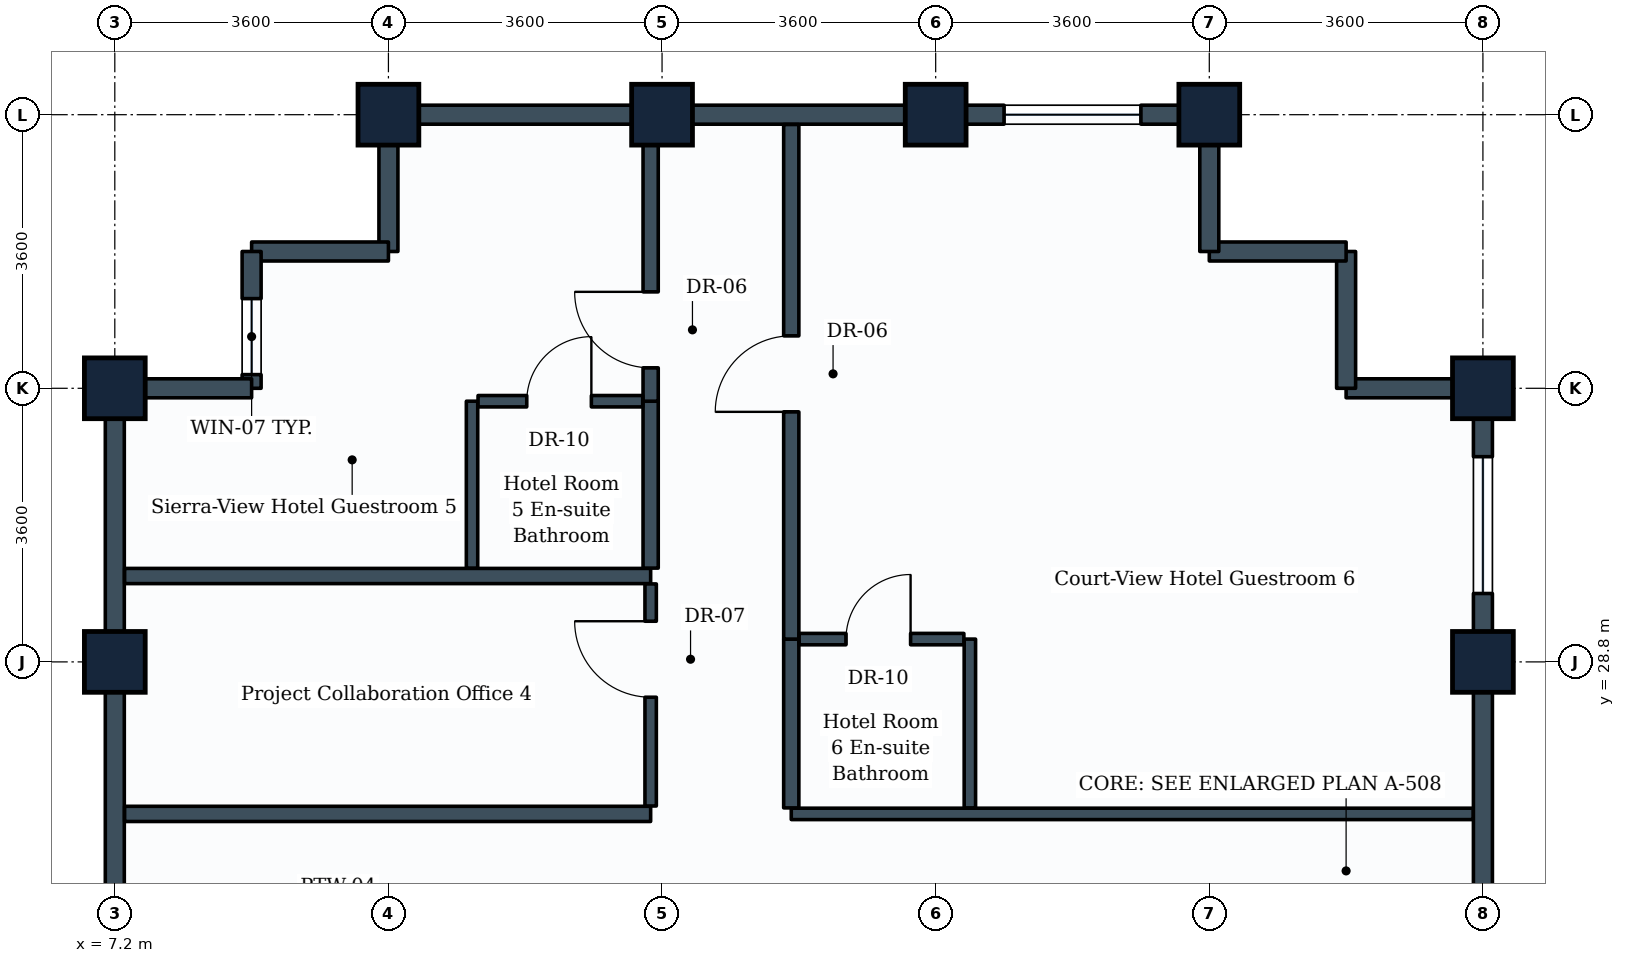
"""IFC4 building model, lengths in metres.
Left out: names, types, materials, properties, quantities, classifications, styles, units other than length and angle.
Written with IfcOpenShell. Run it as: python <this file> out.ifc"""

import sys

from ifc_helpers import new_model, si_unit, direction, frame, frame_2d, origin, origin_2d, place, context, subcontext, project, spatial, rectangle, extrude, element, fill, save


model = new_model("IFC4")
c1 = context("Model", 3, precision=1e-05, world=origin(), true_north=direction((0.0, 1.0)))
c2 = subcontext(c1, "Body", "Model", "MODEL_VIEW")
j1 = project(units=[si_unit("LENGTHUNIT", "METRE"), si_unit("PLANEANGLEUNIT", "RADIAN")], contexts=[c1])
p1 = place(None, origin())
s1 = spatial("IfcSite", under=j1, at=p1, CompositionType="ELEMENT")
p2 = place(p1, origin())
s2 = spatial("IfcBuilding", under=s1, at=p2, CompositionType="ELEMENT")
p3 = place(p2, frame((0.0, 0.0, 235.4)))
s3 = spatial("IfcBuildingStorey", under=s2, at=p3, CompositionType="ELEMENT", Elevation=235.4)
for number, where, z_axis, x_axis in (
    (1, (7.2, 28.8, 0.0), (0.0, 0.0, 1.0), (0.0, 1.0, 0.0)),
    (2, (7.2, 32.4, 0.0), (0.0, 0.0, 1.0), (0.0, 1.0, 0.0)),
    (3, (10.8, 36.0, 0.0), (0.0, 0.0, 1.0), (1.0, 0.0, 0.0)),
    (4, (14.4, 36.0, 0.0), (0.0, 0.0, 1.0), (1.0, 0.0, 0.0)),
    (5, (18.0, 36.0, 0.0), (0.0, 0.0, 1.0), (1.0, 0.0, 0.0)),
    (6, (21.6, 36.0, 0.0), (0.0, 0.0, 1.0), (1.0, 0.0, 0.0)),
    (7, (25.2, 28.8, 0.0), (0.0, 0.0, 1.0), (0.0, 1.0, 0.0)),
    (8, (25.2, 32.4, 0.0), (0.0, 0.0, 1.0), (0.0, 1.0, 0.0)),
):
    element("IfcColumn", number, at=place(p3, frame(where, z_axis=z_axis, x_axis=x_axis)), inside=s3, PredefinedType="COLUMN", context=c2, shape_type="SweptSolid", body=[
        extrude(rectangle(XDim=0.8, YDim=0.8, at=origin_2d()), origin(), (0.0, 0.0, 1.0), 3.6),
    ])
p4 = place(p3, frame((25.2, 28.8, 0.0), z_axis=(0.0, 0.0, 1.0), x_axis=(0.0, -1.0, 0.0)))
e9 = element("IfcWall", 9, at=p4, inside=s3, PredefinedType="STANDARD", context=c2, shape_type="SweptSolid", body=[
    extrude(rectangle(XDim=3.6, YDim=0.25, at=frame_2d((1.8, 0.0))), origin(), (0.0, 0.0, 1.0), 2.83),
])
p5 = place(p3, frame((25.2, 32.4, 0.0), z_axis=(0.0, 0.0, 1.0), x_axis=(0.0, -1.0, 0.0)))
e10 = element("IfcWall", 10, at=p5, inside=s3, PredefinedType="STANDARD", context=c2, shape_type="SweptSolid", body=[
    extrude(rectangle(XDim=3.6, YDim=0.25, at=frame_2d((1.8, 0.0))), origin(), (0.0, 0.0, 1.0), 2.83),
])
p6 = place(p5, frame((0.9, 0.0, 0.85)))
e11 = element("IfcOpeningElement", 11, at=p6, cuts=e10, PredefinedType="OPENING", context=c2, shape_type="SweptSolid", body=[
    extrude(rectangle(XDim=1.8, YDim=1.35, at=frame_2d((0.9, 0.675))), frame((0.0, 0.135, 0.0), z_axis=(0.0, -1.0, 0.0), x_axis=(1.0, 0.0, 0.0)), (0.0, 0.0, 1.0), 0.27),
])
p7 = place(p3, frame((23.4, 32.4, 0.0), z_axis=(0.0, 0.0, 1.0), x_axis=(1.0, 0.0, 0.0)))
e12 = element("IfcWall", 12, at=p7, inside=s3, PredefinedType="STANDARD", context=c2, shape_type="SweptSolid", body=[
    extrude(rectangle(XDim=1.8, YDim=0.25, at=frame_2d((0.9, 0.0))), origin(), (0.0, 0.0, 1.0), 2.83),
])
p8 = place(p3, frame((23.4, 32.4, 0.0), z_axis=(0.0, 0.0, 1.0), x_axis=(0.0, 1.0, 0.0)))
e13 = element("IfcWall", 13, at=p8, inside=s3, PredefinedType="STANDARD", context=c2, shape_type="SweptSolid", body=[
    extrude(rectangle(XDim=1.8, YDim=0.25, at=frame_2d((0.9, 0.0))), origin(), (0.0, 0.0, 1.0), 3.335),
])
p9 = place(p3, frame((21.6, 34.2, 0.0), z_axis=(0.0, 0.0, 1.0), x_axis=(1.0, 0.0, 0.0)))
e14 = element("IfcWall", 14, at=p9, inside=s3, PredefinedType="STANDARD", context=c2, shape_type="SweptSolid", body=[
    extrude(rectangle(XDim=1.8, YDim=0.25, at=frame_2d((0.9, 0.0))), origin(), (0.0, 0.0, 1.0), 3.335),
])
p10 = place(p3, frame((21.6, 34.2, 0.0), z_axis=(0.0, 0.0, 1.0), x_axis=(0.0, 1.0, 0.0)))
e15 = element("IfcWall", 15, at=p10, inside=s3, PredefinedType="STANDARD", context=c2, shape_type="SweptSolid", body=[
    extrude(rectangle(XDim=1.8, YDim=0.25, at=frame_2d((0.9, 0.0))), origin(), (0.0, 0.0, 1.0), 2.83),
])
p11 = place(p3, frame((18.0, 36.0, 0.0), z_axis=(0.0, 0.0, 1.0), x_axis=(1.0, 0.0, 0.0)))
e16 = element("IfcWall", 16, at=p11, inside=s3, PredefinedType="STANDARD", context=c2, shape_type="SweptSolid", body=[
    extrude(rectangle(XDim=3.6, YDim=0.25, at=frame_2d((1.8, 0.0))), origin(), (0.0, 0.0, 1.0), 2.83),
])
p12 = place(p11, frame((0.9, 0.0, 0.85)))
e17 = element("IfcOpeningElement", 17, at=p12, cuts=e16, PredefinedType="OPENING", context=c2, shape_type="SweptSolid", body=[
    extrude(rectangle(XDim=1.8, YDim=1.35, at=frame_2d((0.9, 0.675))), frame((0.0, 0.135, 0.0), z_axis=(0.0, -1.0, 0.0), x_axis=(1.0, 0.0, 0.0)), (0.0, 0.0, 1.0), 0.27),
])
p13 = place(p3, frame((14.4, 36.0, 0.0), z_axis=(0.0, 0.0, 1.0), x_axis=(1.0, 0.0, 0.0)))
e18 = element("IfcWall", 18, at=p13, inside=s3, PredefinedType="STANDARD", context=c2, shape_type="SweptSolid", body=[
    extrude(rectangle(XDim=3.6, YDim=0.25, at=frame_2d((1.8, 0.0))), origin(), (0.0, 0.0, 1.0), 2.83),
])
p14 = place(p3, frame((10.8, 36.0, 0.0), z_axis=(0.0, 0.0, 1.0), x_axis=(1.0, 0.0, 0.0)))
e19 = element("IfcWall", 19, at=p14, inside=s3, PredefinedType="STANDARD", context=c2, shape_type="SweptSolid", body=[
    extrude(rectangle(XDim=3.6, YDim=0.25, at=frame_2d((1.8, 0.0))), origin(), (0.0, 0.0, 1.0), 2.83),
])
p15 = place(p3, frame((10.8, 34.2, 0.0), z_axis=(0.0, 0.0, 1.0), x_axis=(0.0, 1.0, 0.0)))
e20 = element("IfcWall", 20, at=p15, inside=s3, PredefinedType="STANDARD", context=c2, shape_type="SweptSolid", body=[
    extrude(rectangle(XDim=1.8, YDim=0.25, at=frame_2d((0.9, 0.0))), origin(), (0.0, 0.0, 1.0), 2.83),
])
p16 = place(p3, frame((9.0, 34.2, 0.0), z_axis=(0.0, 0.0, 1.0), x_axis=(1.0, 0.0, 0.0)))
e21 = element("IfcWall", 21, at=p16, inside=s3, PredefinedType="STANDARD", context=c2, shape_type="SweptSolid", body=[
    extrude(rectangle(XDim=1.8, YDim=0.25, at=frame_2d((0.9, 0.0))), origin(), (0.0, 0.0, 1.0), 3.335),
])
p17 = place(p3, frame((9.0, 32.4, 0.0), z_axis=(0.0, 0.0, 1.0), x_axis=(0.0, 1.0, 0.0)))
e22 = element("IfcWall", 22, at=p17, inside=s3, PredefinedType="STANDARD", context=c2, shape_type="SweptSolid", body=[
    extrude(rectangle(XDim=1.8, YDim=0.25, at=frame_2d((0.9, 0.0))), origin(), (0.0, 0.0, 1.0), 3.335),
])
p18 = place(p17, frame((0.18, 0.0, 0.85)))
e23 = element("IfcOpeningElement", 23, at=p18, cuts=e22, PredefinedType="OPENING", context=c2, shape_type="SweptSolid", body=[
    extrude(rectangle(XDim=1.0, YDim=1.35, at=frame_2d((0.5, 0.675))), frame((0.0, 0.135, 0.0), z_axis=(0.0, -1.0, 0.0), x_axis=(1.0, 0.0, 0.0)), (0.0, 0.0, 1.0), 0.27),
])
p19 = place(p3, frame((7.2, 32.4, 0.0), z_axis=(0.0, 0.0, 1.0), x_axis=(1.0, 0.0, 0.0)))
e24 = element("IfcWall", 24, at=p19, inside=s3, PredefinedType="STANDARD", context=c2, shape_type="SweptSolid", body=[
    extrude(rectangle(XDim=1.8, YDim=0.25, at=frame_2d((0.9, 0.0))), origin(), (0.0, 0.0, 1.0), 2.83),
])
p20 = place(p3, frame((7.2, 28.8, 0.0), z_axis=(0.0, 0.0, 1.0), x_axis=(0.0, 1.0, 0.0)))
e25 = element("IfcWall", 25, at=p20, inside=s3, PredefinedType="STANDARD", context=c2, shape_type="SweptSolid", body=[
    extrude(rectangle(XDim=3.6, YDim=0.25, at=frame_2d((1.8, 0.0))), origin(), (0.0, 0.0, 1.0), 2.83),
])
p21 = place(p3, frame((7.2, 25.2, 0.0), z_axis=(0.0, 0.0, 1.0), x_axis=(0.0, 1.0, 0.0)))
e26 = element("IfcWall", 26, at=p21, inside=s3, PredefinedType="STANDARD", context=c2, shape_type="SweptSolid", body=[
    extrude(rectangle(XDim=3.6, YDim=0.25, at=frame_2d((1.8, 0.0))), origin(), (0.0, 0.0, 1.0), 2.83),
])
for number, where, z_axis, x_axis in (
    (27, (7.329, 26.8, 0.0), (0.0, 0.0, 1.0), (1.0, 0.0, 0.0)),
    (28, (7.329, 29.93, 0.0), (0.0, 0.0, 1.0), (1.0, 0.0, 0.0)),
):
    element("IfcWall", number, at=place(p3, frame(where, z_axis=z_axis, x_axis=x_axis)), inside=s3, PredefinedType="PARTITIONING", context=c2, shape_type="SweptSolid", body=[
        extrude(rectangle(XDim=6.921, YDim=0.2, at=frame_2d((3.46, 0.0))), origin(), (0.0, 0.0, 1.0), 2.83),
    ])
p22 = place(p3, frame((14.25, 26.904, 0.0), z_axis=(0.0, 0.0, 1.0), x_axis=(0.0, 1.0, 0.0)))
e29 = element("IfcWall", 29, at=p22, inside=s3, PredefinedType="PARTITIONING", context=c2, shape_type="SweptSolid", body=[
    extrude(rectangle(XDim=2.922, YDim=0.15, at=frame_2d((1.461, 0.0))), origin(), (0.0, 0.0, 1.0), 3.03),
])
p23 = place(p22, frame((1.431, 0.0, 0.0)))
e30 = element("IfcOpeningElement", 30, at=p23, cuts=e29, PredefinedType="OPENING", context=c2, shape_type="SweptSolid", body=[
    extrude(rectangle(XDim=1.0, YDim=2.1, at=frame_2d((0.5, 1.05))), frame((0.0, 0.085, 0.0), z_axis=(0.0, -1.0, 0.0), x_axis=(1.0, 0.0, 0.0)), (0.0, 0.0, 1.0), 0.17),
])
p24 = place(p3, frame((14.25, 30.034, 0.0), z_axis=(0.0, 0.0, 1.0), x_axis=(0.0, 1.0, 0.0)))
e31 = element("IfcWall", 31, at=p24, inside=s3, PredefinedType="PARTITIONING", context=c2, shape_type="SweptSolid", body=[
    extrude(rectangle(XDim=2.196, YDim=0.2, at=frame_2d((1.098, 0.0))), origin(), (0.0, 0.0, 1.0), 3.335),
])
p25 = place(p3, frame((14.25, 32.23, 0.0), z_axis=(0.0, 0.0, 1.0), x_axis=(0.0, 1.0, 0.0)))
e32 = element("IfcWall", 32, at=p25, inside=s3, PredefinedType="PARTITIONING", context=c2, shape_type="SweptSolid", body=[
    extrude(rectangle(XDim=3.641, YDim=0.2, at=frame_2d((1.821, 0.0))), origin(), (0.0, 0.0, 1.0), 2.83),
])
p26 = place(p25, frame((0.439, 0.0, 0.0)))
e33 = element("IfcOpeningElement", 33, at=p26, cuts=e32, PredefinedType="OPENING", context=c2, shape_type="SweptSolid", body=[
    extrude(rectangle(XDim=1.0, YDim=2.1, at=frame_2d((0.5, 1.05))), frame((0.0, 0.11, 0.0), z_axis=(0.0, -1.0, 0.0), x_axis=(1.0, 0.0, 0.0)), (0.0, 0.0, 1.0), 0.22),
])
p27 = place(p3, frame((11.9, 30.034, 0.0), z_axis=(0.0, 0.0, 1.0), x_axis=(0.0, 1.0, 0.0)))
e34 = element("IfcWall", 34, at=p27, inside=s3, PredefinedType="PARTITIONING", context=c2, shape_type="SweptSolid", body=[
    extrude(rectangle(XDim=2.196, YDim=0.15, at=frame_2d((1.098, 0.0))), origin(), (0.0, 0.0, 1.0), 3.335),
])
p28 = place(p3, frame((11.979, 32.23, 0.0), z_axis=(0.0, 0.0, 1.0), x_axis=(1.0, 0.0, 0.0)))
e35 = element("IfcWall", 35, at=p28, inside=s3, PredefinedType="PARTITIONING", context=c2, shape_type="SweptSolid", body=[
    extrude(rectangle(XDim=2.167, YDim=0.15, at=frame_2d((1.083, 0.0))), origin(), (0.0, 0.0, 1.0), 3.335),
])
p29 = place(p28, frame((0.641, 0.0, 0.0)))
e36 = element("IfcOpeningElement", 36, at=p29, cuts=e35, PredefinedType="OPENING", context=c2, shape_type="SweptSolid", body=[
    extrude(rectangle(XDim=0.85, YDim=2.1, at=frame_2d((0.425, 1.05))), frame((0.0, 0.085, 0.0), z_axis=(0.0, -1.0, 0.0), x_axis=(1.0, 0.0, 0.0)), (0.0, 0.0, 1.0), 0.17),
])
p30 = place(p3, frame((16.1, 26.8, 0.0), z_axis=(0.0, 0.0, 1.0), x_axis=(1.0, 0.0, 0.0)))
e37 = element("IfcWall", 37, at=p30, inside=s3, PredefinedType="PARTITIONING", context=c2, shape_type="SweptSolid", body=[
    extrude(rectangle(XDim=8.971, YDim=0.15, at=frame_2d((4.485, 0.0))), origin(), (0.0, 0.0, 1.0), 2.83),
])
p31 = place(p3, frame((16.1, 26.879, 0.0), z_axis=(0.0, 0.0, 1.0), x_axis=(0.0, 1.0, 0.0)))
e38 = element("IfcWall", 38, at=p31, inside=s3, PredefinedType="PARTITIONING", context=c2, shape_type="SweptSolid", body=[
    extrude(rectangle(XDim=2.221, YDim=0.2, at=frame_2d((1.111, 0.0))), origin(), (0.0, 0.0, 1.0), 3.03),
])
p32 = place(p3, frame((16.1, 29.1, 0.0), z_axis=(0.0, 0.0, 1.0), x_axis=(0.0, 1.0, 0.0)))
e39 = element("IfcWall", 39, at=p32, inside=s3, PredefinedType="PARTITIONING", context=c2, shape_type="SweptSolid", body=[
    extrude(rectangle(XDim=6.771, YDim=0.2, at=frame_2d((3.385, 0.0))), origin(), (0.0, 0.0, 1.0), 2.83),
])
p33 = place(p32, frame((2.99, 0.0, 0.0)))
e40 = element("IfcOpeningElement", 40, at=p33, cuts=e39, PredefinedType="OPENING", context=c2, shape_type="SweptSolid", body=[
    extrude(rectangle(XDim=1.0, YDim=2.1, at=frame_2d((0.5, 1.05))), frame((0.0, 0.11, 0.0), z_axis=(0.0, -1.0, 0.0), x_axis=(1.0, 0.0, 0.0)), (0.0, 0.0, 1.0), 0.22),
])
p34 = place(p3, frame((18.45, 26.879, 0.0), z_axis=(0.0, 0.0, 1.0), x_axis=(0.0, 1.0, 0.0)))
e41 = element("IfcWall", 41, at=p34, inside=s3, PredefinedType="PARTITIONING", context=c2, shape_type="SweptSolid", body=[
    extrude(rectangle(XDim=2.221, YDim=0.15, at=frame_2d((1.111, 0.0))), origin(), (0.0, 0.0, 1.0), 3.03),
])
p35 = place(p3, frame((16.204, 29.1, 0.0), z_axis=(0.0, 0.0, 1.0), x_axis=(1.0, 0.0, 0.0)))
e42 = element("IfcWall", 42, at=p35, inside=s3, PredefinedType="PARTITIONING", context=c2, shape_type="SweptSolid", body=[
    extrude(rectangle(XDim=2.167, YDim=0.15, at=frame_2d((1.083, 0.0))), origin(), (0.0, 0.0, 1.0), 3.03),
])
p36 = place(p35, frame((0.616, 0.0, 0.0)))
e43 = element("IfcOpeningElement", 43, at=p36, cuts=e42, PredefinedType="OPENING", context=c2, shape_type="SweptSolid", body=[
    extrude(rectangle(XDim=0.85, YDim=2.1, at=frame_2d((0.425, 1.05))), frame((0.0, 0.085, 0.0), z_axis=(0.0, -1.0, 0.0), x_axis=(1.0, 0.0, 0.0)), (0.0, 0.0, 1.0), 0.17),
])
p37 = place(p6, origin())
e44 = element("IfcWindow", 44, at=p37, inside=s3, PartitioningType="SINGLE_PANEL", PredefinedType="WINDOW", context=c2, shape_type="SweptSolid", body=[
    extrude(rectangle(XDim=1.8, YDim=1.35, at=frame_2d((0.9, 0.675))), frame((0.0, 0.03, 0.0), z_axis=(0.0, -1.0, 0.0), x_axis=(1.0, 0.0, 0.0)), (0.0, 0.0, 1.0), 0.06),
])
fill(e11, e44)
p38 = place(p12, origin())
e45 = element("IfcWindow", 45, at=p38, inside=s3, PartitioningType="SINGLE_PANEL", PredefinedType="WINDOW", context=c2, shape_type="SweptSolid", body=[
    extrude(rectangle(XDim=1.8, YDim=1.35, at=frame_2d((0.9, 0.675))), frame((0.0, 0.03, 0.0), z_axis=(0.0, -1.0, 0.0), x_axis=(1.0, 0.0, 0.0)), (0.0, 0.0, 1.0), 0.06),
])
fill(e17, e45)
p39 = place(p23, origin())
e46 = element("IfcDoor", 46, at=p39, inside=s3, OperationType="SINGLE_SWING_RIGHT", PredefinedType="DOOR", context=c2, shape_type="SweptSolid", body=[
    extrude(rectangle(XDim=1.0, YDim=2.1, at=frame_2d((0.5, 1.05))), frame((0.0, 0.025, 0.0), z_axis=(0.0, -1.0, 0.0), x_axis=(1.0, 0.0, 0.0)), (0.0, 0.0, 1.0), 0.05),
])
fill(e30, e46)
p40 = place(p26, origin())
e47 = element("IfcDoor", 47, at=p40, inside=s3, OperationType="SINGLE_SWING_RIGHT", PredefinedType="DOOR", context=c2, shape_type="SweptSolid", body=[
    extrude(rectangle(XDim=1.0, YDim=2.1, at=frame_2d((0.5, 1.05))), frame((0.0, 0.025, 0.0), z_axis=(0.0, -1.0, 0.0), x_axis=(1.0, 0.0, 0.0)), (0.0, 0.0, 1.0), 0.05),
])
fill(e33, e47)
p41 = place(p29, origin())
e48 = element("IfcDoor", 48, at=p41, inside=s3, OperationType="SINGLE_SWING_RIGHT", PredefinedType="DOOR", context=c2, shape_type="SweptSolid", body=[
    extrude(rectangle(XDim=0.85, YDim=2.1, at=frame_2d((0.425, 1.05))), frame((0.0, 0.025, 0.0), z_axis=(0.0, -1.0, 0.0), x_axis=(1.0, 0.0, 0.0)), (0.0, 0.0, 1.0), 0.05),
])
fill(e36, e48)
p42 = place(p33, origin())
e49 = element("IfcDoor", 49, at=p42, inside=s3, OperationType="SINGLE_SWING_LEFT", PredefinedType="DOOR", context=c2, shape_type="SweptSolid", body=[
    extrude(rectangle(XDim=1.0, YDim=2.1, at=frame_2d((0.5, 1.05))), frame((0.0, 0.025, 0.0), z_axis=(0.0, -1.0, 0.0), x_axis=(1.0, 0.0, 0.0)), (0.0, 0.0, 1.0), 0.05),
])
fill(e40, e49)
p43 = place(p36, origin())
e50 = element("IfcDoor", 50, at=p43, inside=s3, OperationType="SINGLE_SWING_RIGHT", PredefinedType="DOOR", context=c2, shape_type="SweptSolid", body=[
    extrude(rectangle(XDim=0.85, YDim=2.1, at=frame_2d((0.425, 1.05))), frame((0.0, 0.025, 0.0), z_axis=(0.0, -1.0, 0.0), x_axis=(1.0, 0.0, 0.0)), (0.0, 0.0, 1.0), 0.05),
])
fill(e43, e50)
p44 = place(p18, origin())
e51 = element("IfcWindow", 51, at=p44, inside=s3, PartitioningType="SINGLE_PANEL", PredefinedType="WINDOW", context=c2, shape_type="SweptSolid", body=[
    extrude(rectangle(XDim=1.0, YDim=1.35, at=frame_2d((0.5, 0.675))), frame((0.0, 0.03, 0.0), z_axis=(0.0, -1.0, 0.0), x_axis=(1.0, 0.0, 0.0)), (0.0, 0.0, 1.0), 0.06),
])
fill(e23, e51)
save(model, sys.argv[1])
